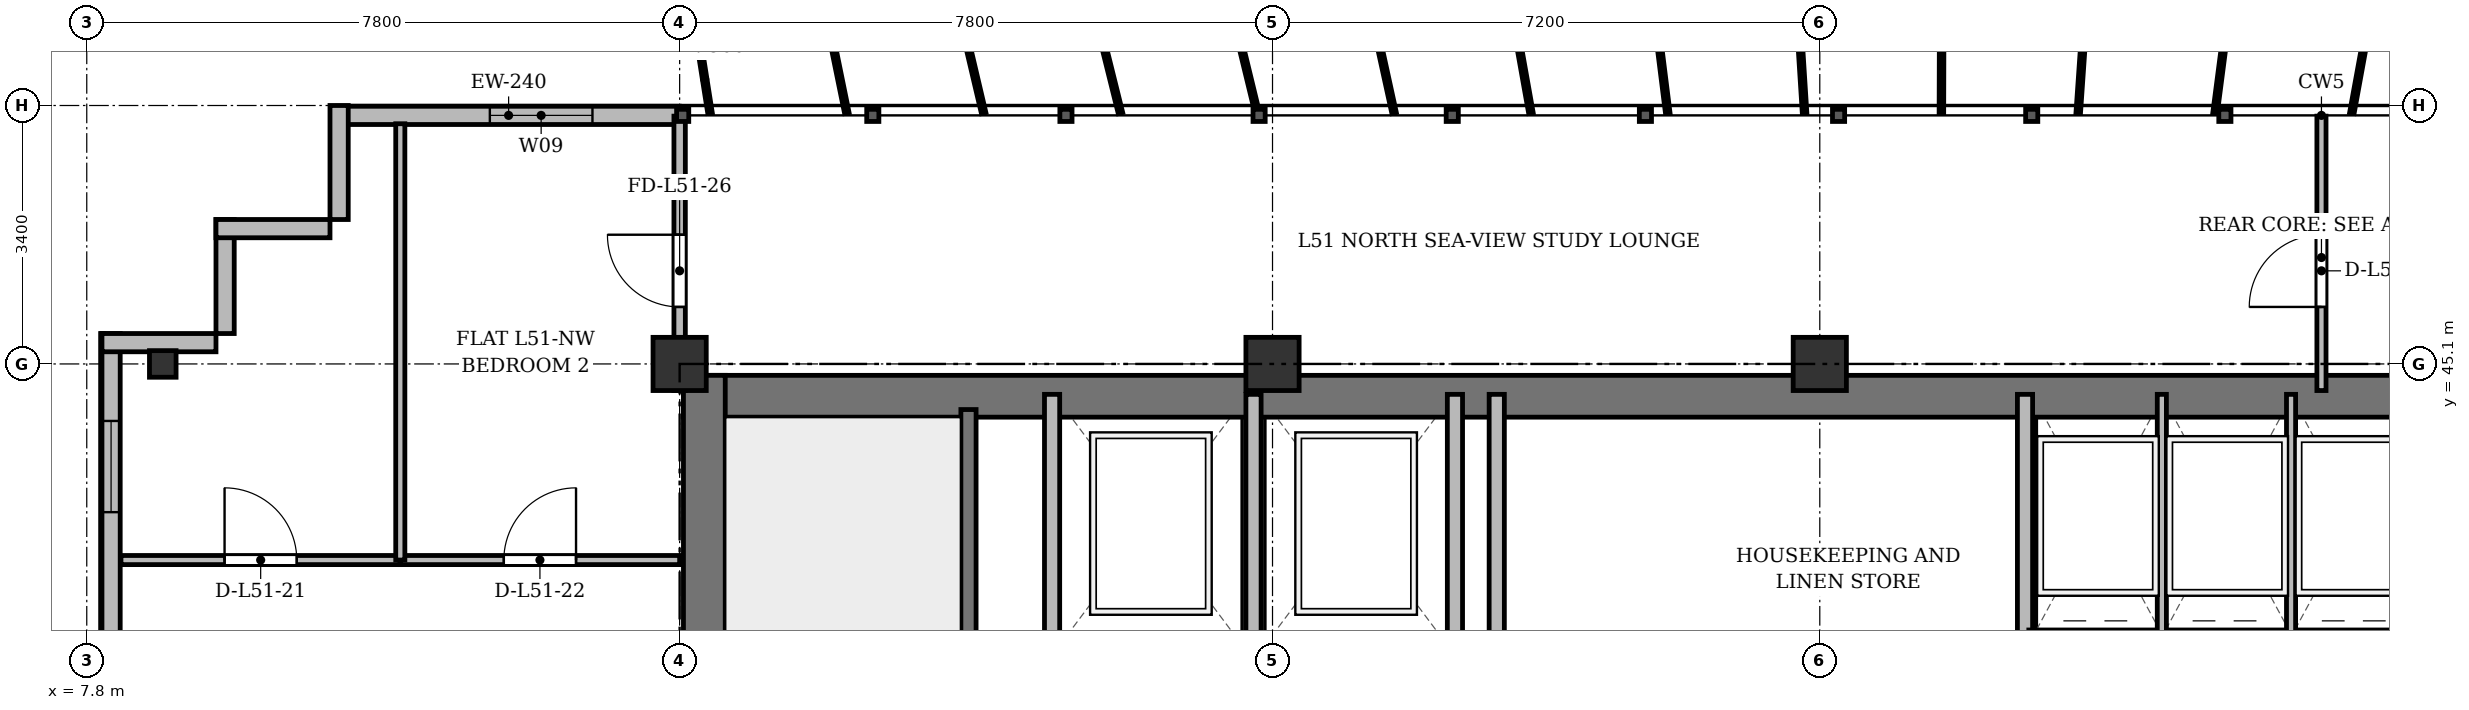
"""IFC4 building model, lengths in metres.
Left out: names, types, materials, properties, quantities, classifications, styles, units other than length and angle.
Written with IfcOpenShell. Run it as: python <this file> out.ifc"""

import sys

from ifc_helpers import new_model, si_unit, direction, frame, frame_2d, origin, origin_2d, place, context, subcontext, project, spatial, rectangle, i_section, extrude, source, transform, mapped, element, fill, save


model = new_model("IFC4")
c1 = context("Model", 3, precision=1e-05, world=origin(), true_north=direction((0.0, 1.0)))
c2 = subcontext(c1, "Body", "Model", "MODEL_VIEW")
j1 = project(units=[si_unit("LENGTHUNIT", "METRE"), si_unit("PLANEANGLEUNIT", "RADIAN")], contexts=[c1])
p1 = place(None, origin())
s1 = spatial("IfcSite", under=j1, at=p1, CompositionType="ELEMENT")
p2 = place(p1, origin())
s2 = spatial("IfcBuilding", under=s1, at=p2, CompositionType="ELEMENT")
p3 = place(p2, frame((0.0, 0.0, 197.7)))
s3 = spatial("IfcBuildingStorey", under=s2, at=p3, CompositionType="ELEMENT", Elevation=197.7)
m1 = source(origin(), c2, "Body", "SweptSolid", [
    extrude(i_section(OverallWidth=0.35, OverallDepth=0.35, WebThickness=0.018, FlangeThickness=0.028, at=origin_2d()), origin(), (0.0, 0.0, 1.0), 3.6),
])
p4 = place(p3, frame((8.8, 45.1, 0.0), z_axis=(0.0, 0.0, 1.0), x_axis=(1.0, 0.0, 0.0)))
e1 = element("IfcColumn", 1, at=p4, inside=s3, PredefinedType="COLUMN", context=c2, shape_type="MappedRepresentation", body=[
    mapped(m1, transform((0.0, 0.0, 0.0), x_axis=(1.0, 0.0, 0.0), y_axis=(0.0, 1.0, 0.0), z_axis=(0.0, 0.0, 1.0), scale=1.0)),
])
m2 = source(origin(), c2, "Body", "SweptSolid", [
    extrude(rectangle(XDim=0.7, YDim=0.7, at=origin_2d()), origin(), (0.0, 0.0, 1.0), 3.6),
])
for number, where, z_axis, x_axis in (
    (2, (15.6, 45.1, 0.0), (0.0, 0.0, 1.0), (1.0, 0.0, 0.0)),
    (3, (23.4, 45.1, 0.0), (0.0, 0.0, 1.0), (1.0, 0.0, 0.0)),
    (4, (30.6, 45.1, 0.0), (0.0, 0.0, 1.0), (1.0, 0.0, 0.0)),
):
    element("IfcColumn", number, at=place(p3, frame(where, z_axis=z_axis, x_axis=x_axis)), inside=s3, PredefinedType="COLUMN", context=c2, shape_type="MappedRepresentation", body=[
        mapped(m2, transform((0.0, 0.0, 0.0), x_axis=(1.0, 0.0, 0.0), y_axis=(0.0, 1.0, 0.0), z_axis=(0.0, 0.0, 1.0), scale=1.0)),
    ])
p5 = place(p3, frame((11.1, 48.37, 0.0), z_axis=(0.0, 0.0, 1.0), x_axis=(1.0, 0.0, 0.0)))
e5 = element("IfcWall", 5, at=p5, inside=s3, PredefinedType="SOLIDWALL", context=c2, shape_type="SweptSolid", body=[
    extrude(rectangle(XDim=4.5, YDim=0.24, at=frame_2d((2.25, 0.0))), origin(), (0.0, 0.0, 1.0), 3.36),
])
p6 = place(p5, frame((2.003, 0.0, 0.9)))
e6 = element("IfcOpeningElement", 6, at=p6, cuts=e5, PredefinedType="OPENING", context=c2, shape_type="SweptSolid", body=[
    extrude(rectangle(XDim=1.35, YDim=1.5, at=frame_2d((0.675, 0.75))), frame((0.0, 0.13, 0.0), z_axis=(0.0, -1.0, 0.0), x_axis=(1.0, 0.0, 0.0)), (0.0, 0.0, 1.0), 0.26),
])
p7 = place(p3, frame((8.12, 6.4, 0.0), z_axis=(0.0, 0.0, 1.0), x_axis=(0.0, 1.0, 0.0)))
e7 = element("IfcWall", 7, at=p7, inside=s3, PredefinedType="SOLIDWALL", context=c2, shape_type="SweptSolid", body=[
    extrude(rectangle(XDim=39.1, YDim=0.24, at=frame_2d((19.55, 0.0))), origin(), (0.0, 0.0, 1.0), 3.36),
])
p8 = place(p7, frame((1.45, 0.0, 0.92)))
e8 = element("IfcOpeningElement", 8, at=p8, cuts=e7, PredefinedType="OPENING", context=c2, shape_type="SweptSolid", body=[
    extrude(rectangle(XDim=1.2, YDim=1.65, at=frame_2d((0.6, 0.825))), frame((0.0, 0.13, 0.0), z_axis=(0.0, -1.0, 0.0), x_axis=(1.0, 0.0, 0.0)), (0.0, 0.0, 1.0), 0.26),
])
p9 = place(p7, frame((3.8, 0.0, 0.92)))
e9 = element("IfcOpeningElement", 9, at=p9, cuts=e7, PredefinedType="OPENING", context=c2, shape_type="SweptSolid", body=[
    extrude(rectangle(XDim=2.4, YDim=2.1, at=frame_2d((1.2, 1.05))), frame((0.0, 0.13, 0.0), z_axis=(0.0, -1.0, 0.0), x_axis=(1.0, 0.0, 0.0)), (0.0, 0.0, 1.0), 0.26),
])
p10 = place(p7, frame((8.0, 0.0, 0.92)))
e10 = element("IfcOpeningElement", 10, at=p10, cuts=e7, PredefinedType="OPENING", context=c2, shape_type="SweptSolid", body=[
    extrude(rectangle(XDim=2.4, YDim=2.1, at=frame_2d((1.2, 1.05))), frame((0.0, 0.13, 0.0), z_axis=(0.0, -1.0, 0.0), x_axis=(1.0, 0.0, 0.0)), (0.0, 0.0, 1.0), 0.26),
])
p11 = place(p7, frame((15.2, 0.0, 0.92)))
e11 = element("IfcOpeningElement", 11, at=p11, cuts=e7, PredefinedType="OPENING", context=c2, shape_type="SweptSolid", body=[
    extrude(rectangle(XDim=2.4, YDim=2.1, at=frame_2d((1.2, 1.05))), frame((0.0, 0.13, 0.0), z_axis=(0.0, -1.0, 0.0), x_axis=(1.0, 0.0, 0.0)), (0.0, 0.0, 1.0), 0.26),
])
p12 = place(p7, frame((33.4, 0.0, 0.92)))
e12 = element("IfcOpeningElement", 12, at=p12, cuts=e7, PredefinedType="OPENING", context=c2, shape_type="SweptSolid", body=[
    extrude(rectangle(XDim=1.2, YDim=1.65, at=frame_2d((0.6, 0.825))), frame((0.0, 0.13, 0.0), z_axis=(0.0, -1.0, 0.0), x_axis=(1.0, 0.0, 0.0)), (0.0, 0.0, 1.0), 0.26),
])
p13 = place(p7, frame((36.75, 0.0, 0.92)))
e13 = element("IfcOpeningElement", 13, at=p13, cuts=e7, PredefinedType="OPENING", context=c2, shape_type="SweptSolid", body=[
    extrude(rectangle(XDim=1.2, YDim=1.65, at=frame_2d((0.6, 0.825))), frame((0.0, 0.13, 0.0), z_axis=(0.0, -1.0, 0.0), x_axis=(1.0, 0.0, 0.0)), (0.0, 0.0, 1.0), 0.26),
])
for number, where, z_axis, x_axis in (
    (14, (8.0, 45.38, 0.0), (0.0, 0.0, 1.0), (1.0, 0.0, 0.0)),
    (15, (9.62, 45.5, 0.0), (0.0, 0.0, 1.0), (0.0, 1.0, 0.0)),
    (16, (9.5, 46.88, 0.0), (0.0, 0.0, 1.0), (1.0, 0.0, 0.0)),
    (17, (11.12, 47.0, 0.0), (0.0, 0.0, 1.0), (0.0, 1.0, 0.0)),
):
    element("IfcWall", number, at=place(p3, frame(where, z_axis=z_axis, x_axis=x_axis)), inside=s3, PredefinedType="SOLIDWALL", context=c2, shape_type="SweptSolid", body=[
        extrude(rectangle(XDim=1.5, YDim=0.24, at=frame_2d((0.75, 0.0))), origin(), (0.0, 0.0, 1.0), 3.36),
    ])
p14 = place(p3, frame((15.65, 44.675, 0.0), z_axis=(0.0, 0.0, 1.0), x_axis=(1.0, 0.0, 0.0)))
e18 = element("IfcWall", 18, at=p14, inside=s3, PredefinedType="SHEAR", context=c2, shape_type="SweptSolid", body=[
    extrude(rectangle(XDim=43.1, YDim=0.55, at=frame_2d((21.55, 0.0))), origin(), (0.0, 0.0, 1.0), 3.36),
])
p15 = place(p3, frame((15.925, 33.4, 0.0), z_axis=(0.0, 0.0, 1.0), x_axis=(0.0, 1.0, 0.0)))
e19 = element("IfcWall", 19, at=p15, inside=s3, PredefinedType="SHEAR", context=c2, shape_type="SweptSolid", body=[
    extrude(rectangle(XDim=11.55, YDim=0.55, at=frame_2d((5.775, 0.0))), origin(), (0.0, 0.0, 1.0), 3.36),
])
p16 = place(p3, frame((19.4, 33.4, 0.0), z_axis=(0.0, 0.0, 1.0), x_axis=(0.0, 1.0, 0.0)))
e20 = element("IfcWall", 20, at=p16, inside=s3, PredefinedType="SHEAR", context=c2, shape_type="SweptSolid", body=[
    extrude(rectangle(XDim=11.1, YDim=0.2, at=frame_2d((5.55, 0.0))), origin(), (0.0, 0.0, 1.0), 3.36),
])
p17 = place(p16, frame((0.85, 0.0, 0.0)))
e21 = element("IfcOpeningElement", 21, at=p17, cuts=e20, PredefinedType="OPENING", context=c2, shape_type="SweptSolid", body=[
    extrude(rectangle(XDim=1.1, YDim=2.15, at=frame_2d((0.55, 1.075))), frame((0.0, 0.11, 0.0), z_axis=(0.0, -1.0, 0.0), x_axis=(1.0, 0.0, 0.0)), (0.0, 0.0, 1.0), 0.22),
])
for number, where, z_axis, x_axis in (
    (22, (20.5, 41.3, 0.0), (0.0, 0.0, 1.0), (0.0, 1.0, 0.0)),
    (23, (23.15, 41.3, 0.0), (0.0, 0.0, 1.0), (0.0, 1.0, 0.0)),
    (24, (25.8, 41.3, 0.0), (0.0, 0.0, 1.0), (0.0, 1.0, 0.0)),
):
    element("IfcWall", number, at=place(p3, frame(where, z_axis=z_axis, x_axis=x_axis)), inside=s3, PredefinedType="SOLIDWALL", context=c2, shape_type="SweptSolid", body=[
        extrude(rectangle(XDim=3.4, YDim=0.2, at=frame_2d((1.7, 0.0))), origin(), (0.0, 0.0, 1.0), 3.36),
    ])
for number, where, z_axis, x_axis in (
    (25, (26.35, 33.4, 0.0), (0.0, 0.0, 1.0), (0.0, 1.0, 0.0)),
    (26, (33.3, 33.4, 0.0), (0.0, 0.0, 1.0), (0.0, 1.0, 0.0)),
):
    element("IfcWall", number, at=place(p3, frame(where, z_axis=z_axis, x_axis=x_axis)), inside=s3, PredefinedType="SOLIDWALL", context=c2, shape_type="SweptSolid", body=[
        extrude(rectangle(XDim=11.3, YDim=0.2, at=frame_2d((5.65, 0.0))), origin(), (0.0, 0.0, 1.0), 2.91),
    ])
for number, where, z_axis, x_axis in (
    (27, (35.1, 41.5, 0.0), (0.0, 0.0, 1.0), (0.0, 1.0, 0.0)),
    (28, (36.8, 41.5, 0.0), (0.0, 0.0, 1.0), (0.0, 1.0, 0.0)),
):
    element("IfcWall", number, at=place(p3, frame(where, z_axis=z_axis, x_axis=x_axis)), inside=s3, PredefinedType="PARTITIONING", context=c2, shape_type="SweptSolid", body=[
        extrude(rectangle(XDim=3.2, YDim=0.12, at=frame_2d((1.6, 0.0))), origin(), (0.0, 0.0, 1.0), 3.36),
    ])
p18 = place(p3, frame((8.25, 42.52, 0.0), z_axis=(0.0, 0.0, 1.0), x_axis=(1.0, 0.0, 0.0)))
e29 = element("IfcWall", 29, at=p18, inside=s3, PredefinedType="PARTITIONING", context=c2, shape_type="SweptSolid", body=[
    extrude(rectangle(XDim=3.675, YDim=0.12, at=frame_2d((1.837, 0.0))), origin(), (0.0, 0.0, 1.0), 2.86),
])
p19 = place(p18, frame((1.363, 0.0, 0.0)))
e30 = element("IfcOpeningElement", 30, at=p19, cuts=e29, PredefinedType="OPENING", context=c2, shape_type="SweptSolid", body=[
    extrude(rectangle(XDim=0.95, YDim=2.15, at=frame_2d((0.475, 1.075))), frame((0.0, 0.07, 0.0), z_axis=(0.0, -1.0, 0.0), x_axis=(1.0, 0.0, 0.0)), (0.0, 0.0, 1.0), 0.14),
])
p20 = place(p3, frame((11.925, 42.52, 0.0), z_axis=(0.0, 0.0, 1.0), x_axis=(1.0, 0.0, 0.0)))
e31 = element("IfcWall", 31, at=p20, inside=s3, PredefinedType="PARTITIONING", context=c2, shape_type="SweptSolid", body=[
    extrude(rectangle(XDim=3.675, YDim=0.12, at=frame_2d((1.837, 0.0))), origin(), (0.0, 0.0, 1.0), 2.86),
])
p21 = place(p20, frame((1.362, 0.0, 0.0)))
e32 = element("IfcOpeningElement", 32, at=p21, cuts=e31, PredefinedType="OPENING", context=c2, shape_type="SweptSolid", body=[
    extrude(rectangle(XDim=0.95, YDim=2.15, at=frame_2d((0.475, 1.075))), frame((0.0, 0.07, 0.0), z_axis=(0.0, -1.0, 0.0), x_axis=(1.0, 0.0, 0.0)), (0.0, 0.0, 1.0), 0.14),
])
p22 = place(p3, frame((11.925, 42.52, 0.0), z_axis=(0.0, 0.0, 1.0), x_axis=(0.0, 1.0, 0.0)))
e33 = element("IfcWall", 33, at=p22, inside=s3, PredefinedType="PARTITIONING", context=c2, shape_type="SweptSolid", body=[
    extrude(rectangle(XDim=5.74, YDim=0.12, at=frame_2d((2.87, 0.0))), origin(), (0.0, 0.0, 1.0), 2.91),
])
p23 = place(p3, frame((37.2, 44.75, 0.0), z_axis=(0.0, 0.0, 1.0), x_axis=(0.0, 1.0, 0.0)))
e34 = element("IfcWall", 34, at=p23, inside=s3, PredefinedType="PARTITIONING", context=c2, shape_type="SweptSolid", body=[
    extrude(rectangle(XDim=3.61, YDim=0.12, at=frame_2d((1.805, 0.0))), origin(), (0.0, 0.0, 1.0), 2.91),
])
p24 = place(p23, frame((1.1, 0.0, 0.0)))
e35 = element("IfcOpeningElement", 35, at=p24, cuts=e34, PredefinedType="OPENING", context=c2, shape_type="SweptSolid", body=[
    extrude(rectangle(XDim=0.95, YDim=2.15, at=frame_2d((0.475, 1.075))), frame((0.0, 0.07, 0.0), z_axis=(0.0, -1.0, 0.0), x_axis=(1.0, 0.0, 0.0)), (0.0, 0.0, 1.0), 0.14),
])
p25 = place(p3, frame((15.6, 44.75, 0.0), z_axis=(0.0, 0.0, 1.0), x_axis=(0.0, 1.0, 0.0)))
e36 = element("IfcWall", 36, at=p25, inside=s3, PredefinedType="PARTITIONING", context=c2, shape_type="SweptSolid", body=[
    extrude(rectangle(XDim=3.61, YDim=0.15, at=frame_2d((1.805, 0.0))), origin(), (0.0, 0.0, 1.0), 2.86),
])
p26 = place(p25, frame((1.1, 0.0, 0.0)))
e37 = element("IfcOpeningElement", 37, at=p26, cuts=e36, PredefinedType="OPENING", context=c2, shape_type="SweptSolid", body=[
    extrude(rectangle(XDim=0.95, YDim=2.15, at=frame_2d((0.475, 1.075))), frame((0.0, 0.085, 0.0), z_axis=(0.0, -1.0, 0.0), x_axis=(1.0, 0.0, 0.0)), (0.0, 0.0, 1.0), 0.17),
])
m3 = source(origin(), c2, "Body", "SweptSolid", [
    extrude(rectangle(XDim=1.35, YDim=1.5, at=frame_2d((0.675, 0.75))), frame((0.0, 0.03, 0.0), z_axis=(0.0, -1.0, 0.0), x_axis=(1.0, 0.0, 0.0)), (0.0, 0.0, 1.0), 0.06),
])
p27 = place(p6, origin())
e38 = element("IfcWindow", 38, at=p27, inside=s3, PartitioningType="SINGLE_PANEL", PredefinedType="WINDOW", context=c2, shape_type="MappedRepresentation", body=[
    mapped(m3, transform((0.0, 0.0, 0.0), x_axis=(1.0, 0.0, 0.0), y_axis=(0.0, 1.0, 0.0), z_axis=(0.0, 0.0, 1.0), scale=1.0)),
])
fill(e6, e38)
m4 = source(origin(), c2, "Body", "SweptSolid", [
    extrude(rectangle(XDim=1.2, YDim=1.65, at=frame_2d((0.6, 0.825))), frame((0.0, 0.03, 0.0), z_axis=(0.0, -1.0, 0.0), x_axis=(1.0, 0.0, 0.0)), (0.0, 0.0, 1.0), 0.06),
])
p28 = place(p13, origin())
e39 = element("IfcWindow", 39, at=p28, inside=s3, PartitioningType="SINGLE_PANEL", PredefinedType="WINDOW", context=c2, shape_type="MappedRepresentation", body=[
    mapped(m4, transform((0.0, 0.0, 0.0), x_axis=(1.0, 0.0, 0.0), y_axis=(0.0, 1.0, 0.0), z_axis=(0.0, 0.0, 1.0), scale=1.0)),
])
fill(e13, e39)
m5 = source(origin(), c2, "Body", "SweptSolid", [
    extrude(rectangle(XDim=0.95, YDim=2.15, at=frame_2d((0.475, 1.075))), frame((0.0, 0.025, 0.0), z_axis=(0.0, -1.0, 0.0), x_axis=(1.0, 0.0, 0.0)), (0.0, 0.0, 1.0), 0.05),
])
p29 = place(p19, origin())
e40 = element("IfcDoor", 40, at=p29, inside=s3, OperationType="SINGLE_SWING_LEFT", PredefinedType="DOOR", context=c2, shape_type="MappedRepresentation", body=[
    mapped(m5, transform((0.0, 0.0, 0.0), x_axis=(1.0, 0.0, 0.0), y_axis=(0.0, 1.0, 0.0), z_axis=(0.0, 0.0, 1.0), scale=1.0)),
])
fill(e30, e40)
p30 = place(p21, origin())
e41 = element("IfcDoor", 41, at=p30, inside=s3, OperationType="SINGLE_SWING_RIGHT", PredefinedType="DOOR", context=c2, shape_type="MappedRepresentation", body=[
    mapped(m5, transform((0.0, 0.0, 0.0), x_axis=(1.0, 0.0, 0.0), y_axis=(0.0, 1.0, 0.0), z_axis=(0.0, 0.0, 1.0), scale=1.0)),
])
fill(e32, e41)
p31 = place(p24, origin())
e42 = element("IfcDoor", 42, at=p31, inside=s3, OperationType="SINGLE_SWING_LEFT", PredefinedType="DOOR", context=c2, shape_type="MappedRepresentation", body=[
    mapped(m5, transform((0.0, 0.0, 0.0), x_axis=(1.0, 0.0, 0.0), y_axis=(0.0, 1.0, 0.0), z_axis=(0.0, 0.0, 1.0), scale=1.0)),
])
fill(e35, e42)
p32 = place(p26, origin())
e43 = element("IfcDoor", 43, at=p32, inside=s3, OperationType="SINGLE_SWING_RIGHT", PredefinedType="DOOR", context=c2, shape_type="MappedRepresentation", body=[
    mapped(m5, transform((0.0, 0.0, 0.0), x_axis=(1.0, 0.0, 0.0), y_axis=(0.0, 1.0, 0.0), z_axis=(0.0, 0.0, 1.0), scale=1.0)),
])
fill(e37, e43)
save(model, sys.argv[1])
